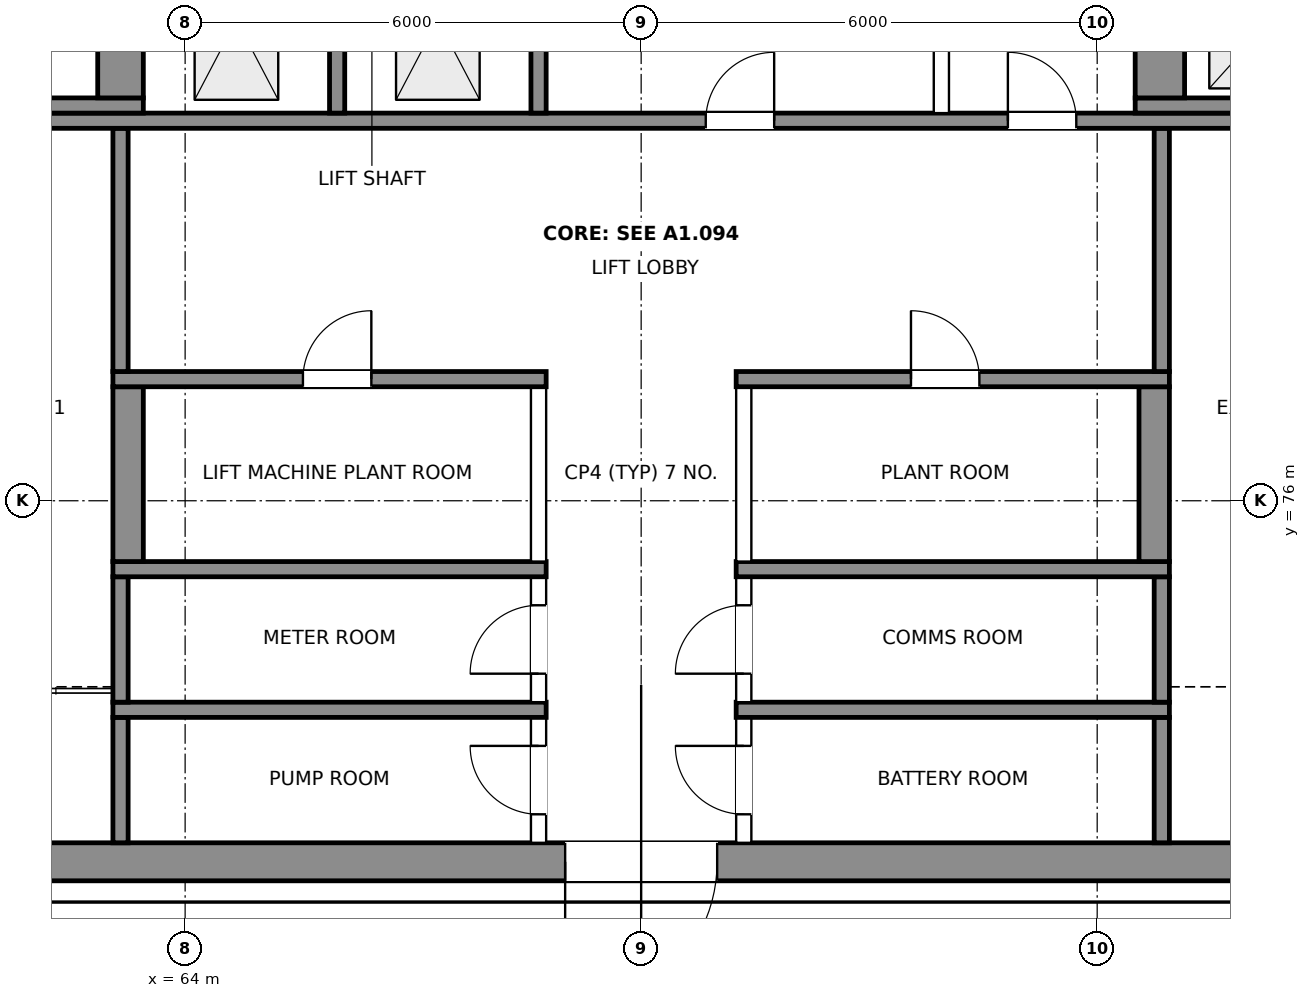
"""IFC4 building model, lengths in metres.
Left out: names, types, materials, properties, quantities, classifications, styles, units other than length and angle.
Written with IfcOpenShell. Run it as: python <this file> out.ifc"""

import sys

from ifc_helpers import new_model, si_unit, direction, frame, frame_2d, origin, place, context, subcontext, project, spatial, rectangle, extrude, element, fill, save


model = new_model("IFC4")
c1 = context("Model", 3, precision=1e-05, world=origin(), true_north=direction((0.0, 1.0)))
c2 = subcontext(c1, "Body", "Model", "MODEL_VIEW")
j1 = project(units=[si_unit("LENGTHUNIT", "METRE"), si_unit("PLANEANGLEUNIT", "RADIAN")], contexts=[c1])
p1 = place(None, origin())
s1 = spatial("IfcSite", under=j1, at=p1, CompositionType="ELEMENT")
p2 = place(p1, origin())
s2 = spatial("IfcBuilding", under=s1, at=p2, CompositionType="ELEMENT")
p3 = place(p2, frame((0.0, 0.0, 342.2)))
s3 = spatial("IfcBuildingStorey", under=s2, at=p3, CompositionType="ELEMENT", Elevation=342.2)
p4 = place(p3, frame((59.0, 71.25, 0.0), z_axis=(0.0, 0.0, 1.0), x_axis=(1.0, 0.0, 0.0)))
e1 = element("IfcWall", 1, at=p4, inside=s3, PredefinedType="SHEAR", context=c2, shape_type="SweptSolid", body=[
    extrude(rectangle(XDim=22.0, YDim=0.5, at=frame_2d((11.0, 0.0))), origin(), (0.0, 0.0, 1.0), 4.5),
])
p5 = place(p4, frame((2.025, 0.0, 0.0)))
e2 = element("IfcOpeningElement", 2, at=p5, cuts=e1, PredefinedType="OPENING", context=c2, shape_type="SweptSolid", body=[
    extrude(rectangle(XDim=1.2, YDim=2.1, at=frame_2d((0.6, 1.05))), frame((0.0, 0.26, 0.0), z_axis=(0.0, -1.0, 0.0), x_axis=(1.0, 0.0, 0.0)), (0.0, 0.0, 1.0), 0.52),
])
p6 = place(p4, frame((18.775, 0.0, 0.0)))
e3 = element("IfcOpeningElement", 3, at=p6, cuts=e1, PredefinedType="OPENING", context=c2, shape_type="SweptSolid", body=[
    extrude(rectangle(XDim=1.2, YDim=2.1, at=frame_2d((0.6, 1.05))), frame((0.0, 0.26, 0.0), z_axis=(0.0, -1.0, 0.0), x_axis=(1.0, 0.0, 0.0)), (0.0, 0.0, 1.0), 0.52),
])
p7 = place(p4, frame((10.0, 0.0, 0.0)))
e4 = element("IfcOpeningElement", 4, at=p7, cuts=e1, PredefinedType="OPENING", context=c2, shape_type="SweptSolid", body=[
    extrude(rectangle(XDim=2.0, YDim=2.1, at=frame_2d((1.0, 1.05))), frame((0.0, 0.26, 0.0), z_axis=(0.0, -1.0, 0.0), x_axis=(1.0, 0.0, 0.0)), (0.0, 0.0, 1.0), 0.52),
])
p8 = place(p3, frame((63.15, 71.5, 0.0), z_axis=(0.0, 0.0, 1.0), x_axis=(0.0, 1.0, 0.0)))
e5 = element("IfcWall", 5, at=p8, inside=s3, PredefinedType="SHEAR", context=c2, shape_type="SweptSolid", body=[
    extrude(rectangle(XDim=1.65, YDim=0.2, at=frame_2d((0.825, 0.0))), origin(), (0.0, 0.0, 1.0), 4.5),
])
p9 = place(p3, frame((68.65, 71.5, 0.0), z_axis=(0.0, 0.0, 1.0), x_axis=(0.0, 1.0, 0.0)))
e6 = element("IfcWall", 6, at=p9, inside=s3, PredefinedType="PARTITIONING", context=c2, shape_type="SweptSolid", body=[
    extrude(rectangle(XDim=1.65, YDim=0.2, at=frame_2d((0.825, 0.0))), origin(), (0.0, 0.0, 1.0), 4.2),
])
p10 = place(p9, frame((0.375, 0.0, 0.0)))
e7 = element("IfcOpeningElement", 7, at=p10, cuts=e6, PredefinedType="OPENING", context=c2, shape_type="SweptSolid", body=[
    extrude(rectangle(XDim=0.9, YDim=2.1, at=frame_2d((0.45, 1.05))), frame((0.0, 0.11, 0.0), z_axis=(0.0, -1.0, 0.0), x_axis=(1.0, 0.0, 0.0)), (0.0, 0.0, 1.0), 0.22),
])
p11 = place(p3, frame((71.35, 71.5, 0.0), z_axis=(0.0, 0.0, 1.0), x_axis=(0.0, 1.0, 0.0)))
e8 = element("IfcWall", 8, at=p11, inside=s3, PredefinedType="PARTITIONING", context=c2, shape_type="SweptSolid", body=[
    extrude(rectangle(XDim=1.65, YDim=0.2, at=frame_2d((0.825, 0.0))), origin(), (0.0, 0.0, 1.0), 4.2),
])
p12 = place(p11, frame((0.375, 0.0, 0.0)))
e9 = element("IfcOpeningElement", 9, at=p12, cuts=e8, PredefinedType="OPENING", context=c2, shape_type="SweptSolid", body=[
    extrude(rectangle(XDim=0.9, YDim=2.1, at=frame_2d((0.45, 1.05))), frame((0.0, 0.11, 0.0), z_axis=(0.0, -1.0, 0.0), x_axis=(1.0, 0.0, 0.0)), (0.0, 0.0, 1.0), 0.22),
])
p13 = place(p3, frame((76.85, 71.5, 0.0), z_axis=(0.0, 0.0, 1.0), x_axis=(0.0, 1.0, 0.0)))
e10 = element("IfcWall", 10, at=p13, inside=s3, PredefinedType="SHEAR", context=c2, shape_type="SweptSolid", body=[
    extrude(rectangle(XDim=1.65, YDim=0.2, at=frame_2d((0.825, 0.0))), origin(), (0.0, 0.0, 1.0), 4.5),
])
for number, where, z_axis, x_axis in (
    (11, (63.05, 73.25, 0.0), (0.0, 0.0, 1.0), (1.0, 0.0, 0.0)),
    (12, (71.25, 73.25, 0.0), (0.0, 0.0, 1.0), (1.0, 0.0, 0.0)),
):
    element("IfcWall", number, at=place(p3, frame(where, z_axis=z_axis, x_axis=x_axis)), inside=s3, PredefinedType="SHEAR", context=c2, shape_type="SweptSolid", body=[
        extrude(rectangle(XDim=5.7, YDim=0.2, at=frame_2d((2.85, 0.0))), origin(), (0.0, 0.0, 1.0), 4.5),
    ])
p14 = place(p3, frame((63.15, 73.35, 0.0), z_axis=(0.0, 0.0, 1.0), x_axis=(0.0, 1.0, 0.0)))
e13 = element("IfcWall", 13, at=p14, inside=s3, PredefinedType="SHEAR", context=c2, shape_type="SweptSolid", body=[
    extrude(rectangle(XDim=1.65, YDim=0.2, at=frame_2d((0.825, 0.0))), origin(), (0.0, 0.0, 1.0), 4.5),
])
p15 = place(p3, frame((68.65, 73.35, 0.0), z_axis=(0.0, 0.0, 1.0), x_axis=(0.0, 1.0, 0.0)))
e14 = element("IfcWall", 14, at=p15, inside=s3, PredefinedType="PARTITIONING", context=c2, shape_type="SweptSolid", body=[
    extrude(rectangle(XDim=1.65, YDim=0.2, at=frame_2d((0.825, 0.0))), origin(), (0.0, 0.0, 1.0), 4.2),
])
p16 = place(p15, frame((0.375, 0.0, 0.0)))
e15 = element("IfcOpeningElement", 15, at=p16, cuts=e14, PredefinedType="OPENING", context=c2, shape_type="SweptSolid", body=[
    extrude(rectangle(XDim=0.9, YDim=2.1, at=frame_2d((0.45, 1.05))), frame((0.0, 0.11, 0.0), z_axis=(0.0, -1.0, 0.0), x_axis=(1.0, 0.0, 0.0)), (0.0, 0.0, 1.0), 0.22),
])
p17 = place(p3, frame((71.35, 73.35, 0.0), z_axis=(0.0, 0.0, 1.0), x_axis=(0.0, 1.0, 0.0)))
e16 = element("IfcWall", 16, at=p17, inside=s3, PredefinedType="PARTITIONING", context=c2, shape_type="SweptSolid", body=[
    extrude(rectangle(XDim=1.65, YDim=0.2, at=frame_2d((0.825, 0.0))), origin(), (0.0, 0.0, 1.0), 4.2),
])
p18 = place(p17, frame((0.375, 0.0, 0.0)))
e17 = element("IfcOpeningElement", 17, at=p18, cuts=e16, PredefinedType="OPENING", context=c2, shape_type="SweptSolid", body=[
    extrude(rectangle(XDim=0.9, YDim=2.1, at=frame_2d((0.45, 1.05))), frame((0.0, 0.11, 0.0), z_axis=(0.0, -1.0, 0.0), x_axis=(1.0, 0.0, 0.0)), (0.0, 0.0, 1.0), 0.22),
])
p19 = place(p3, frame((76.85, 73.35, 0.0), z_axis=(0.0, 0.0, 1.0), x_axis=(0.0, 1.0, 0.0)))
e18 = element("IfcWall", 18, at=p19, inside=s3, PredefinedType="SHEAR", context=c2, shape_type="SweptSolid", body=[
    extrude(rectangle(XDim=1.65, YDim=0.2, at=frame_2d((0.825, 0.0))), origin(), (0.0, 0.0, 1.0), 4.5),
])
for number, where, z_axis, x_axis in (
    (19, (63.05, 75.1, 0.0), (0.0, 0.0, 1.0), (1.0, 0.0, 0.0)),
    (20, (71.25, 75.1, 0.0), (0.0, 0.0, 1.0), (1.0, 0.0, 0.0)),
):
    element("IfcWall", number, at=place(p3, frame(where, z_axis=z_axis, x_axis=x_axis)), inside=s3, PredefinedType="SHEAR", context=c2, shape_type="SweptSolid", body=[
        extrude(rectangle(XDim=5.7, YDim=0.2, at=frame_2d((2.85, 0.0))), origin(), (0.0, 0.0, 1.0), 4.5),
    ])
p20 = place(p3, frame((63.25, 75.2, 0.0), z_axis=(0.0, 0.0, 1.0), x_axis=(0.0, 1.0, 0.0)))
e21 = element("IfcWall", 21, at=p20, inside=s3, PredefinedType="SHEAR", context=c2, shape_type="SweptSolid", body=[
    extrude(rectangle(XDim=2.3, YDim=0.4, at=frame_2d((1.15, 0.0))), origin(), (0.0, 0.0, 1.0), 4.5),
])
for number, where, z_axis, x_axis in (
    (22, (68.65, 75.2, 0.0), (0.0, 0.0, 1.0), (0.0, 1.0, 0.0)),
    (23, (71.35, 75.2, 0.0), (0.0, 0.0, 1.0), (0.0, 1.0, 0.0)),
):
    element("IfcWall", number, at=place(p3, frame(where, z_axis=z_axis, x_axis=x_axis)), inside=s3, PredefinedType="PARTITIONING", context=c2, shape_type="SweptSolid", body=[
        extrude(rectangle(XDim=2.3, YDim=0.2, at=frame_2d((1.15, 0.0))), origin(), (0.0, 0.0, 1.0), 4.2),
    ])
p21 = place(p3, frame((76.75, 75.2, 0.0), z_axis=(0.0, 0.0, 1.0), x_axis=(0.0, 1.0, 0.0)))
e24 = element("IfcWall", 24, at=p21, inside=s3, PredefinedType="SHEAR", context=c2, shape_type="SweptSolid", body=[
    extrude(rectangle(XDim=2.3, YDim=0.4, at=frame_2d((1.15, 0.0))), origin(), (0.0, 0.0, 1.0), 4.5),
])
p22 = place(p3, frame((63.05, 77.6, 0.0), z_axis=(0.0, 0.0, 1.0), x_axis=(1.0, 0.0, 0.0)))
e25 = element("IfcWall", 25, at=p22, inside=s3, PredefinedType="SHEAR", context=c2, shape_type="SweptSolid", body=[
    extrude(rectangle(XDim=5.7, YDim=0.2, at=frame_2d((2.85, 0.0))), origin(), (0.0, 0.0, 1.0), 4.5),
])
p23 = place(p22, frame((2.5, 0.0, 0.0)))
e26 = element("IfcOpeningElement", 26, at=p23, cuts=e25, PredefinedType="OPENING", context=c2, shape_type="SweptSolid", body=[
    extrude(rectangle(XDim=0.9, YDim=2.1, at=frame_2d((0.45, 1.05))), frame((0.0, 0.11, 0.0), z_axis=(0.0, -1.0, 0.0), x_axis=(1.0, 0.0, 0.0)), (0.0, 0.0, 1.0), 0.22),
])
p24 = place(p3, frame((71.25, 77.6, 0.0), z_axis=(0.0, 0.0, 1.0), x_axis=(1.0, 0.0, 0.0)))
e27 = element("IfcWall", 27, at=p24, inside=s3, PredefinedType="SHEAR", context=c2, shape_type="SweptSolid", body=[
    extrude(rectangle(XDim=5.7, YDim=0.2, at=frame_2d((2.85, 0.0))), origin(), (0.0, 0.0, 1.0), 4.5),
])
p25 = place(p24, frame((2.3, 0.0, 0.0)))
e28 = element("IfcOpeningElement", 28, at=p25, cuts=e27, PredefinedType="OPENING", context=c2, shape_type="SweptSolid", body=[
    extrude(rectangle(XDim=0.9, YDim=2.1, at=frame_2d((0.45, 1.05))), frame((0.0, 0.11, 0.0), z_axis=(0.0, -1.0, 0.0), x_axis=(1.0, 0.0, 0.0)), (0.0, 0.0, 1.0), 0.22),
])
for number, where, z_axis, x_axis in (
    (29, (63.15, 77.7, 0.0), (0.0, 0.0, 1.0), (0.0, 1.0, 0.0)),
    (30, (76.85, 77.7, 0.0), (0.0, 0.0, 1.0), (0.0, 1.0, 0.0)),
):
    element("IfcWall", number, at=place(p3, frame(where, z_axis=z_axis, x_axis=x_axis)), inside=s3, PredefinedType="SHEAR", context=c2, shape_type="SweptSolid", body=[
        extrude(rectangle(XDim=3.2, YDim=0.2, at=frame_2d((1.6, 0.0))), origin(), (0.0, 0.0, 1.0), 4.5),
    ])
p26 = place(p3, frame((59.0, 81.0, 0.0), z_axis=(0.0, 0.0, 1.0), x_axis=(1.0, 0.0, 0.0)))
e31 = element("IfcWall", 31, at=p26, inside=s3, PredefinedType="SHEAR", context=c2, shape_type="SweptSolid", body=[
    extrude(rectangle(XDim=22.0, YDim=0.2, at=frame_2d((11.0, 0.0))), origin(), (0.0, 0.0, 1.0), 4.5),
])
p27 = place(p26, frame((11.85, 0.0, 0.0)))
e32 = element("IfcOpeningElement", 32, at=p27, cuts=e31, PredefinedType="OPENING", context=c2, shape_type="SweptSolid", body=[
    extrude(rectangle(XDim=0.9, YDim=2.1, at=frame_2d((0.45, 1.05))), frame((0.0, 0.11, 0.0), z_axis=(0.0, -1.0, 0.0), x_axis=(1.0, 0.0, 0.0)), (0.0, 0.0, 1.0), 0.22),
])
p28 = place(p26, frame((15.825, 0.0, 0.0)))
e33 = element("IfcOpeningElement", 33, at=p28, cuts=e31, PredefinedType="OPENING", context=c2, shape_type="SweptSolid", body=[
    extrude(rectangle(XDim=0.9, YDim=2.1, at=frame_2d((0.45, 1.05))), frame((0.0, 0.11, 0.0), z_axis=(0.0, -1.0, 0.0), x_axis=(1.0, 0.0, 0.0)), (0.0, 0.0, 1.0), 0.22),
])
p29 = place(p3, frame((59.0, 81.2, 0.0), z_axis=(0.0, 0.0, 1.0), x_axis=(1.0, 0.0, 0.0)))
e34 = element("IfcWall", 34, at=p29, inside=s3, PredefinedType="SHEAR", context=c2, shape_type="SweptSolid", body=[
    extrude(rectangle(XDim=4.45, YDim=0.2, at=frame_2d((2.225, 0.0))), origin(), (0.0, 0.0, 1.0), 4.5),
])
for number, where, z_axis, x_axis in (
    (35, (66.0, 81.1, 0.0), (0.0, 0.0, 1.0), (0.0, 1.0, 0.0)),
    (36, (68.65, 81.1, 0.0), (0.0, 0.0, 1.0), (0.0, 1.0, 0.0)),
):
    element("IfcWall", number, at=place(p3, frame(where, z_axis=z_axis, x_axis=x_axis)), inside=s3, PredefinedType="SHEAR", context=c2, shape_type="SweptSolid", body=[
        extrude(rectangle(XDim=2.45, YDim=0.2, at=frame_2d((1.225, 0.0))), origin(), (0.0, 0.0, 1.0), 4.5),
    ])
p30 = place(p3, frame((73.95, 81.1, 0.0), z_axis=(0.0, 0.0, 1.0), x_axis=(0.0, 1.0, 0.0)))
e37 = element("IfcWall", 37, at=p30, inside=s3, PredefinedType="PARTITIONING", context=c2, shape_type="SweptSolid", body=[
    extrude(rectangle(XDim=2.45, YDim=0.2, at=frame_2d((1.225, 0.0))), origin(), (0.0, 0.0, 1.0), 4.2),
])
p31 = place(p3, frame((76.5, 81.2, 0.0), z_axis=(0.0, 0.0, 1.0), x_axis=(1.0, 0.0, 0.0)))
e38 = element("IfcWall", 38, at=p31, inside=s3, PredefinedType="SHEAR", context=c2, shape_type="SweptSolid", body=[
    extrude(rectangle(XDim=4.5, YDim=0.2, at=frame_2d((2.25, 0.0))), origin(), (0.0, 0.0, 1.0), 4.5),
])
p32 = place(p3, frame((63.15, 81.3, 0.0), z_axis=(0.0, 0.0, 1.0), x_axis=(0.0, 1.0, 0.0)))
e39 = element("IfcWall", 39, at=p32, inside=s3, PredefinedType="SHEAR", context=c2, shape_type="SweptSolid", body=[
    extrude(rectangle(XDim=2.25, YDim=0.6, at=frame_2d((1.125, 0.0))), origin(), (0.0, 0.0, 1.0), 4.5),
])
p33 = place(p3, frame((76.825, 81.3, 0.0), z_axis=(0.0, 0.0, 1.0), x_axis=(0.0, 1.0, 0.0)))
e40 = element("IfcWall", 40, at=p33, inside=s3, PredefinedType="SHEAR", context=c2, shape_type="SweptSolid", body=[
    extrude(rectangle(XDim=2.25, YDim=0.65, at=frame_2d((1.125, 0.0))), origin(), (0.0, 0.0, 1.0), 4.5),
])
p34 = place(p7, frame((2.0, 0.0, 0.0), z_axis=(0.0, 0.0, 1.0), x_axis=(-1.0, 0.0, 0.0)))
e41 = element("IfcDoor", 41, at=p34, inside=s3, OperationType="DOUBLE_DOOR_SINGLE_SWING", PredefinedType="DOOR", context=c2, shape_type="SweptSolid", body=[
    extrude(rectangle(XDim=2.0, YDim=2.1, at=frame_2d((1.0, 1.05))), frame((0.0, 0.025, 0.0), z_axis=(0.0, -1.0, 0.0), x_axis=(1.0, 0.0, 0.0)), (0.0, 0.0, 1.0), 0.05),
])
fill(e4, e41)
p35 = place(p10, origin())
e42 = element("IfcDoor", 42, at=p35, inside=s3, OperationType="SINGLE_SWING_RIGHT", PredefinedType="DOOR", context=c2, shape_type="SweptSolid", body=[
    extrude(rectangle(XDim=0.9, YDim=2.1, at=frame_2d((0.45, 1.05))), frame((0.0, 0.025, 0.0), z_axis=(0.0, -1.0, 0.0), x_axis=(1.0, 0.0, 0.0)), (0.0, 0.0, 1.0), 0.05),
])
fill(e7, e42)
p36 = place(p16, origin())
e43 = element("IfcDoor", 43, at=p36, inside=s3, OperationType="SINGLE_SWING_LEFT", PredefinedType="DOOR", context=c2, shape_type="SweptSolid", body=[
    extrude(rectangle(XDim=0.9, YDim=2.1, at=frame_2d((0.45, 1.05))), frame((0.0, 0.025, 0.0), z_axis=(0.0, -1.0, 0.0), x_axis=(1.0, 0.0, 0.0)), (0.0, 0.0, 1.0), 0.05),
])
fill(e15, e43)
p37 = place(p12, origin())
e44 = element("IfcDoor", 44, at=p37, inside=s3, OperationType="SINGLE_SWING_RIGHT", PredefinedType="DOOR", context=c2, shape_type="SweptSolid", body=[
    extrude(rectangle(XDim=0.9, YDim=2.1, at=frame_2d((0.45, 1.05))), frame((0.0, 0.025, 0.0), z_axis=(0.0, -1.0, 0.0), x_axis=(1.0, 0.0, 0.0)), (0.0, 0.0, 1.0), 0.05),
])
fill(e9, e44)
p38 = place(p18, origin())
e45 = element("IfcDoor", 45, at=p38, inside=s3, OperationType="SINGLE_SWING_LEFT", PredefinedType="DOOR", context=c2, shape_type="SweptSolid", body=[
    extrude(rectangle(XDim=0.9, YDim=2.1, at=frame_2d((0.45, 1.05))), frame((0.0, 0.025, 0.0), z_axis=(0.0, -1.0, 0.0), x_axis=(1.0, 0.0, 0.0)), (0.0, 0.0, 1.0), 0.05),
])
fill(e17, e45)
p39 = place(p23, origin())
e46 = element("IfcDoor", 46, at=p39, inside=s3, OperationType="SINGLE_SWING_RIGHT", PredefinedType="DOOR", context=c2, shape_type="SweptSolid", body=[
    extrude(rectangle(XDim=0.9, YDim=2.1, at=frame_2d((0.45, 1.05))), frame((0.0, 0.025, 0.0), z_axis=(0.0, -1.0, 0.0), x_axis=(1.0, 0.0, 0.0)), (0.0, 0.0, 1.0), 0.05),
])
fill(e26, e46)
p40 = place(p25, origin())
e47 = element("IfcDoor", 47, at=p40, inside=s3, OperationType="SINGLE_SWING_LEFT", PredefinedType="DOOR", context=c2, shape_type="SweptSolid", body=[
    extrude(rectangle(XDim=0.9, YDim=2.1, at=frame_2d((0.45, 1.05))), frame((0.0, 0.025, 0.0), z_axis=(0.0, -1.0, 0.0), x_axis=(1.0, 0.0, 0.0)), (0.0, 0.0, 1.0), 0.05),
])
fill(e28, e47)
p41 = place(p27, origin())
e48 = element("IfcDoor", 48, at=p41, inside=s3, OperationType="SINGLE_SWING_RIGHT", PredefinedType="DOOR", context=c2, shape_type="SweptSolid", body=[
    extrude(rectangle(XDim=0.9, YDim=2.1, at=frame_2d((0.45, 1.05))), frame((0.0, 0.025, 0.0), z_axis=(0.0, -1.0, 0.0), x_axis=(1.0, 0.0, 0.0)), (0.0, 0.0, 1.0), 0.05),
])
fill(e32, e48)
p42 = place(p28, origin())
e49 = element("IfcDoor", 49, at=p42, inside=s3, OperationType="SINGLE_SWING_LEFT", PredefinedType="DOOR", context=c2, shape_type="SweptSolid", body=[
    extrude(rectangle(XDim=0.9, YDim=2.1, at=frame_2d((0.45, 1.05))), frame((0.0, 0.025, 0.0), z_axis=(0.0, -1.0, 0.0), x_axis=(1.0, 0.0, 0.0)), (0.0, 0.0, 1.0), 0.05),
])
fill(e33, e49)
save(model, sys.argv[1])
